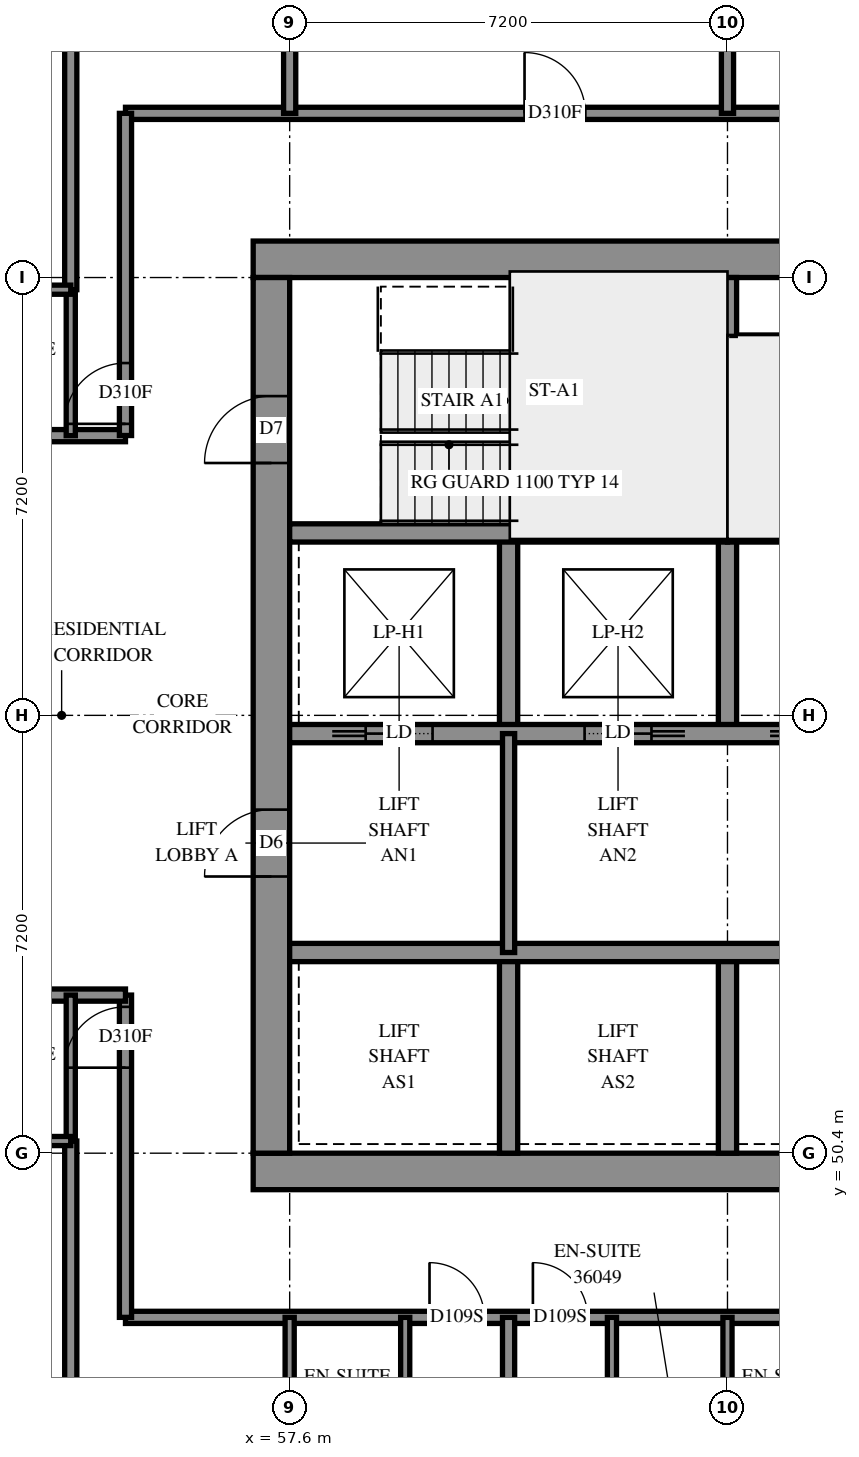
"""IFC4 building model, lengths in metres.
Left out: names, types, materials, properties, quantities, classifications, styles, units other than length and angle.
Written with IfcOpenShell. Run it as: python <this file> out.ifc"""

import sys

from ifc_helpers import new_model, si_unit, direction, frame, frame_2d, origin, place, context, subcontext, project, spatial, rectangle, extrude, element, fill, save


model = new_model("IFC4")
c1 = context("Model", 3, precision=1e-05, world=origin(), true_north=direction((0.0, 1.0)))
c2 = subcontext(c1, "Body", "Model", "MODEL_VIEW")
j1 = project(units=[si_unit("LENGTHUNIT", "METRE"), si_unit("PLANEANGLEUNIT", "RADIAN")], contexts=[c1])
p1 = place(None, origin())
s1 = spatial("IfcSite", under=j1, at=p1, CompositionType="ELEMENT")
p2 = place(p1, origin())
s2 = spatial("IfcBuilding", under=s1, at=p2, CompositionType="ELEMENT")
p3 = place(p2, frame((0.0, 0.0, 135.4)))
s3 = spatial("IfcBuildingStorey", under=s2, at=p3, CompositionType="ELEMENT", Elevation=135.4)
p4 = place(p3, frame((57.0, 50.1, -0.3), z_axis=(0.0, 0.0, 1.0), x_axis=(1.0, 0.0, 0.0)))
e1 = element("IfcWall", 1, at=p4, inside=s3, PredefinedType="SHEAR", context=c2, shape_type="SweptSolid", body=[
    extrude(rectangle(XDim=15.6, YDim=0.6, at=frame_2d((7.8, 0.0))), origin(), (0.0, 0.0, 1.0), 2.7),
])
p5 = place(p3, frame((57.0, 65.1, -0.3), z_axis=(0.0, 0.0, 1.0), x_axis=(1.0, 0.0, 0.0)))
e2 = element("IfcWall", 2, at=p5, inside=s3, PredefinedType="SHEAR", context=c2, shape_type="SweptSolid", body=[
    extrude(rectangle(XDim=15.6, YDim=0.6, at=frame_2d((7.8, 0.0))), origin(), (0.0, 0.0, 1.0), 2.7),
])
p6 = place(p5, frame((10.6, 0.0, 0.3)))
e3 = element("IfcOpeningElement", 3, at=p6, cuts=e2, PredefinedType="OPENING", context=c2, shape_type="SweptSolid", body=[
    extrude(rectangle(XDim=0.8, YDim=2.1, at=frame_2d((0.4, 1.05))), frame((0.0, 0.31, 0.0), z_axis=(0.0, -1.0, 0.0), x_axis=(1.0, 0.0, 0.0)), (0.0, 0.0, 1.0), 0.62),
])
p7 = place(p3, frame((57.3, 50.4, -0.3), z_axis=(0.0, 0.0, 1.0), x_axis=(0.0, 1.0, 0.0)))
e4 = element("IfcWall", 4, at=p7, inside=s3, PredefinedType="SHEAR", context=c2, shape_type="SweptSolid", body=[
    extrude(rectangle(XDim=14.4, YDim=0.6, at=frame_2d((7.2, 0.0))), origin(), (0.0, 0.0, 1.0), 2.7),
])
p8 = place(p7, frame((4.55, 0.0, 0.3)))
e5 = element("IfcOpeningElement", 5, at=p8, cuts=e4, PredefinedType="OPENING", context=c2, shape_type="SweptSolid", body=[
    extrude(rectangle(XDim=1.1, YDim=2.1, at=frame_2d((0.55, 1.05))), frame((0.0, 0.31, 0.0), z_axis=(0.0, -1.0, 0.0), x_axis=(1.0, 0.0, 0.0)), (0.0, 0.0, 1.0), 0.62),
])
p9 = place(p7, frame((11.35, 0.0, 0.3)))
e6 = element("IfcOpeningElement", 6, at=p9, cuts=e4, PredefinedType="OPENING", context=c2, shape_type="SweptSolid", body=[
    extrude(rectangle(XDim=1.1, YDim=2.1, at=frame_2d((0.55, 1.05))), frame((0.0, 0.31, 0.0), z_axis=(0.0, -1.0, 0.0), x_axis=(1.0, 0.0, 0.0)), (0.0, 0.0, 1.0), 0.62),
])
for number, where, z_axis, x_axis in (
    (7, (61.2, 50.4, 0.0), (0.0, 0.0, 1.0), (0.0, 1.0, 0.0)),
    (8, (61.2, 57.3, 0.0), (0.0, 0.0, 1.0), (0.0, 1.0, 0.0)),
    (9, (64.8, 50.4, 0.0), (0.0, 0.0, 1.0), (0.0, 1.0, 0.0)),
    (10, (64.8, 57.3, 0.0), (0.0, 0.0, 1.0), (0.0, 1.0, 0.0)),
):
    element("IfcWall", number, at=place(p3, frame(where, z_axis=z_axis, x_axis=x_axis)), inside=s3, PredefinedType="SOLIDWALL", context=c2, shape_type="SweptSolid", body=[
        extrude(rectangle(XDim=3.3, YDim=0.3, at=frame_2d((1.65, 0.0))), origin(), (0.0, 0.0, 1.0), 3.1),
    ])
p10 = place(p3, frame((57.6, 53.7, 0.0), z_axis=(0.0, 0.0, 1.0), x_axis=(1.0, 0.0, 0.0)))
e11 = element("IfcWall", 11, at=p10, inside=s3, PredefinedType="SOLIDWALL", context=c2, shape_type="SweptSolid", body=[
    extrude(rectangle(XDim=14.4, YDim=0.3, at=frame_2d((7.2, 0.0))), origin(), (0.0, 0.0, 1.0), 3.1),
])
p11 = place(p10, frame((12.05, 0.0, 0.0)))
e12 = element("IfcOpeningElement", 12, at=p11, cuts=e11, PredefinedType="OPENING", context=c2, shape_type="SweptSolid", body=[
    extrude(rectangle(XDim=1.1, YDim=2.1, at=frame_2d((0.55, 1.05))), frame((0.0, 0.16, 0.0), z_axis=(0.0, -1.0, 0.0), x_axis=(1.0, 0.0, 0.0)), (0.0, 0.0, 1.0), 0.32),
])
p12 = place(p3, frame((57.6, 57.3, 0.0), z_axis=(0.0, 0.0, 1.0), x_axis=(1.0, 0.0, 0.0)))
e13 = element("IfcWall", 13, at=p12, inside=s3, PredefinedType="SOLIDWALL", context=c2, shape_type="SweptSolid", body=[
    extrude(rectangle(XDim=14.4, YDim=0.3, at=frame_2d((7.2, 0.0))), origin(), (0.0, 0.0, 1.0), 3.1),
])
p13 = place(p12, frame((1.25, 0.0, 0.0)))
e14 = element("IfcOpeningElement", 14, at=p13, cuts=e13, PredefinedType="OPENING", context=c2, shape_type="SweptSolid", body=[
    extrude(rectangle(XDim=1.1, YDim=2.1, at=frame_2d((0.55, 1.05))), frame((0.0, 0.16, 0.0), z_axis=(0.0, -1.0, 0.0), x_axis=(1.0, 0.0, 0.0)), (0.0, 0.0, 1.0), 0.32),
])
p14 = place(p12, frame((4.85, 0.0, 0.0)))
e15 = element("IfcOpeningElement", 15, at=p14, cuts=e13, PredefinedType="OPENING", context=c2, shape_type="SweptSolid", body=[
    extrude(rectangle(XDim=1.1, YDim=2.1, at=frame_2d((0.55, 1.05))), frame((0.0, 0.16, 0.0), z_axis=(0.0, -1.0, 0.0), x_axis=(1.0, 0.0, 0.0)), (0.0, 0.0, 1.0), 0.32),
])
p15 = place(p12, frame((8.45, 0.0, 0.0)))
e16 = element("IfcOpeningElement", 16, at=p15, cuts=e13, PredefinedType="OPENING", context=c2, shape_type="SweptSolid", body=[
    extrude(rectangle(XDim=1.1, YDim=2.1, at=frame_2d((0.55, 1.05))), frame((0.0, 0.16, 0.0), z_axis=(0.0, -1.0, 0.0), x_axis=(1.0, 0.0, 0.0)), (0.0, 0.0, 1.0), 0.32),
])
p16 = place(p12, frame((12.05, 0.0, 0.0)))
e17 = element("IfcOpeningElement", 17, at=p16, cuts=e13, PredefinedType="OPENING", context=c2, shape_type="SweptSolid", body=[
    extrude(rectangle(XDim=1.1, YDim=2.1, at=frame_2d((0.55, 1.05))), frame((0.0, 0.16, 0.0), z_axis=(0.0, -1.0, 0.0), x_axis=(1.0, 0.0, 0.0)), (0.0, 0.0, 1.0), 0.32),
])
for number, where, z_axis, x_axis in (
    (18, (57.6, 60.6, 0.0), (0.0, 0.0, 1.0), (1.0, 0.0, 0.0)),
    (19, (64.8, 60.6, 0.0), (0.0, 0.0, 1.0), (1.0, 0.0, 0.0)),
):
    element("IfcWall", number, at=place(p3, frame(where, z_axis=z_axis, x_axis=x_axis)), inside=s3, PredefinedType="SOLIDWALL", context=c2, shape_type="SweptSolid", body=[
        extrude(rectangle(XDim=7.2, YDim=0.3, at=frame_2d((3.6, 0.0))), origin(), (0.0, 0.0, 1.0), 3.1),
    ])
p17 = place(p3, frame((64.8, 60.6, 0.0), z_axis=(0.0, 0.0, 1.0), x_axis=(0.0, 1.0, 0.0)))
e20 = element("IfcWall", 20, at=p17, inside=s3, PredefinedType="SOLIDWALL", context=c2, shape_type="SweptSolid", body=[
    extrude(rectangle(XDim=4.2, YDim=0.3, at=frame_2d((2.1, 0.0))), origin(), (0.0, 0.0, 1.0), 3.1),
])
p18 = place(p3, frame((64.95, 63.78, 0.0), z_axis=(0.0, 0.0, 1.0), x_axis=(1.0, 0.0, 0.0)))
e21 = element("IfcWall", 21, at=p18, inside=s3, PredefinedType="PARTITIONING", context=c2, shape_type="SweptSolid", body=[
    extrude(rectangle(XDim=5.65, YDim=0.15, at=frame_2d((2.825, 0.0))), origin(), (0.0, 0.0, 1.0), 3.1),
])
p19 = place(p3, frame((61.2, 53.7, 0.0), z_axis=(0.0, 0.0, 1.0), x_axis=(0.0, 1.0, 0.0)))
e22 = element("IfcWall", 22, at=p19, inside=s3, PredefinedType="PARTITIONING", context=c2, shape_type="SweptSolid", body=[
    extrude(rectangle(XDim=3.6, YDim=0.2, at=frame_2d((1.8, 0.0))), origin(), (0.0, 0.0, 1.0), 3.1),
])
p20 = place(p3, frame((54.9, 67.5, 0.0), z_axis=(0.0, 0.0, 1.0), x_axis=(1.0, 0.0, 0.0)))
e23 = element("IfcWall", 23, at=p20, inside=s3, PredefinedType="PARTITIONING", context=c2, shape_type="SweptSolid", body=[
    extrude(rectangle(XDim=19.8, YDim=0.2, at=frame_2d((9.9, 0.0))), origin(), (0.0, 0.0, 1.0), 3.1),
])
p21 = place(p20, frame((6.562, 0.0, 0.0)))
e24 = element("IfcOpeningElement", 24, at=p21, cuts=e23, PredefinedType="OPENING", context=c2, shape_type="SweptSolid", body=[
    extrude(rectangle(XDim=1.0, YDim=2.1, at=frame_2d((0.5, 1.05))), frame((0.0, 0.11, 0.0), z_axis=(0.0, -1.0, 0.0), x_axis=(1.0, 0.0, 0.0)), (0.0, 0.0, 1.0), 0.22),
])
p22 = place(p20, frame((14.089, 0.0, 0.0)))
e25 = element("IfcOpeningElement", 25, at=p22, cuts=e23, PredefinedType="OPENING", context=c2, shape_type="SweptSolid", body=[
    extrude(rectangle(XDim=1.0, YDim=2.1, at=frame_2d((0.5, 1.05))), frame((0.0, 0.11, 0.0), z_axis=(0.0, -1.0, 0.0), x_axis=(1.0, 0.0, 0.0)), (0.0, 0.0, 1.0), 0.22),
])
p23 = place(p3, frame((54.9, 47.7, 0.0), z_axis=(0.0, 0.0, 1.0), x_axis=(1.0, 0.0, 0.0)))
e26 = element("IfcWall", 26, at=p23, inside=s3, PredefinedType="PARTITIONING", context=c2, shape_type="SweptSolid", body=[
    extrude(rectangle(XDim=19.326, YDim=0.2, at=frame_2d((9.663, 0.0))), origin(), (0.0, 0.0, 1.0), 3.1),
])
p24 = place(p23, frame((5.0, 0.0, 0.0)))
e27 = element("IfcOpeningElement", 27, at=p24, cuts=e26, PredefinedType="OPENING", context=c2, shape_type="SweptSolid", body=[
    extrude(rectangle(XDim=0.9, YDim=2.1, at=frame_2d((0.45, 1.05))), frame((0.0, 0.11, 0.0), z_axis=(0.0, -1.0, 0.0), x_axis=(1.0, 0.0, 0.0)), (0.0, 0.0, 1.0), 0.22),
])
p25 = place(p23, frame((12.2, 0.0, 0.0)))
e28 = element("IfcOpeningElement", 28, at=p25, cuts=e26, PredefinedType="OPENING", context=c2, shape_type="SweptSolid", body=[
    extrude(rectangle(XDim=0.9, YDim=2.1, at=frame_2d((0.45, 1.05))), frame((0.0, 0.11, 0.0), z_axis=(0.0, -1.0, 0.0), x_axis=(1.0, 0.0, 0.0)), (0.0, 0.0, 1.0), 0.22),
])
p26 = place(p23, frame((6.7, 0.0, 0.0)))
e29 = element("IfcOpeningElement", 29, at=p26, cuts=e26, PredefinedType="OPENING", context=c2, shape_type="SweptSolid", body=[
    extrude(rectangle(XDim=0.9, YDim=2.1, at=frame_2d((0.45, 1.05))), frame((0.0, 0.11, 0.0), z_axis=(0.0, -1.0, 0.0), x_axis=(1.0, 0.0, 0.0)), (0.0, 0.0, 1.0), 0.22),
])
p27 = place(p23, frame((13.9, 0.0, 0.0)))
e30 = element("IfcOpeningElement", 30, at=p27, cuts=e26, PredefinedType="OPENING", context=c2, shape_type="SweptSolid", body=[
    extrude(rectangle(XDim=0.9, YDim=2.1, at=frame_2d((0.45, 1.05))), frame((0.0, 0.11, 0.0), z_axis=(0.0, -1.0, 0.0), x_axis=(1.0, 0.0, 0.0)), (0.0, 0.0, 1.0), 0.22),
])
p28 = place(p3, frame((40.602, 62.2, 0.0), z_axis=(0.0, 0.0, 1.0), x_axis=(1.0, 0.0, 0.0)))
e31 = element("IfcWall", 31, at=p28, inside=s3, PredefinedType="PARTITIONING", context=c2, shape_type="SweptSolid", body=[
    extrude(rectangle(XDim=14.298, YDim=0.2, at=frame_2d((7.149, 0.0))), origin(), (0.0, 0.0, 1.0), 3.1),
])
p29 = place(p28, frame((1.306, 0.0, 0.0)))
e32 = element("IfcOpeningElement", 32, at=p29, cuts=e31, PredefinedType="OPENING", context=c2, shape_type="SweptSolid", body=[
    extrude(rectangle(XDim=0.9, YDim=2.1, at=frame_2d((0.45, 1.05))), frame((0.0, 0.11, 0.0), z_axis=(0.0, -1.0, 0.0), x_axis=(1.0, 0.0, 0.0)), (0.0, 0.0, 1.0), 0.22),
])
p30 = place(p28, frame((8.455, 0.0, 0.0)))
e33 = element("IfcOpeningElement", 33, at=p30, cuts=e31, PredefinedType="OPENING", context=c2, shape_type="SweptSolid", body=[
    extrude(rectangle(XDim=0.9, YDim=2.1, at=frame_2d((0.45, 1.05))), frame((0.0, 0.11, 0.0), z_axis=(0.0, -1.0, 0.0), x_axis=(1.0, 0.0, 0.0)), (0.0, 0.0, 1.0), 0.22),
])
p31 = place(p3, frame((54.0, 42.381, 0.0), z_axis=(0.0, 0.0, 1.0), x_axis=(0.0, 1.0, 0.0)))
e34 = element("IfcWall", 34, at=p31, inside=s3, PredefinedType="PARTITIONING", context=c2, shape_type="SweptSolid", body=[
    extrude(rectangle(XDim=8.219, YDim=0.2, at=frame_2d((4.109, 0.0))), origin(), (0.0, 0.0, 1.0), 3.1),
])
p32 = place(p3, frame((54.0, 64.6, 0.0), z_axis=(0.0, 0.0, 1.0), x_axis=(0.0, 1.0, 0.0)))
e35 = element("IfcWall", 35, at=p32, inside=s3, PredefinedType="PARTITIONING", context=c2, shape_type="SweptSolid", body=[
    extrude(rectangle(XDim=8.133, YDim=0.2, at=frame_2d((4.066, 0.0))), origin(), (0.0, 0.0, 1.0), 3.1),
])
p33 = place(p3, frame((54.9, 47.7, 0.0), z_axis=(0.0, 0.0, 1.0), x_axis=(0.0, 1.0, 0.0)))
e36 = element("IfcWall", 36, at=p33, inside=s3, PredefinedType="PARTITIONING", context=c2, shape_type="SweptSolid", body=[
    extrude(rectangle(XDim=5.3, YDim=0.2, at=frame_2d((2.65, 0.0))), origin(), (0.0, 0.0, 1.0), 3.1),
])
p34 = place(p33, frame((4.106, 0.0, 0.0)))
e37 = element("IfcOpeningElement", 37, at=p34, cuts=e36, PredefinedType="OPENING", context=c2, shape_type="SweptSolid", body=[
    extrude(rectangle(XDim=1.0, YDim=2.1, at=frame_2d((0.5, 1.05))), frame((0.0, 0.11, 0.0), z_axis=(0.0, -1.0, 0.0), x_axis=(1.0, 0.0, 0.0)), (0.0, 0.0, 1.0), 0.22),
])
p35 = place(p3, frame((61.2, 42.35, 0.0), z_axis=(0.0, 0.0, 1.0), x_axis=(0.0, 1.0, 0.0)))
e38 = element("IfcWall", 38, at=p35, inside=s3, PredefinedType="PARTITIONING", context=c2, shape_type="SweptSolid", body=[
    extrude(rectangle(XDim=5.35, YDim=0.2, at=frame_2d((2.675, 0.0))), origin(), (0.0, 0.0, 1.0), 3.1),
])
p36 = place(p3, frame((54.9, 62.202, 0.0), z_axis=(0.0, 0.0, 1.0), x_axis=(0.0, 1.0, 0.0)))
e39 = element("IfcWall", 39, at=p36, inside=s3, PredefinedType="PARTITIONING", context=c2, shape_type="SweptSolid", body=[
    extrude(rectangle(XDim=5.298, YDim=0.2, at=frame_2d((2.649, 0.0))), origin(), (0.0, 0.0, 1.0), 3.1),
])
p37 = place(p36, frame((0.192, 0.0, 0.0)))
e40 = element("IfcOpeningElement", 40, at=p37, cuts=e39, PredefinedType="OPENING", context=c2, shape_type="SweptSolid", body=[
    extrude(rectangle(XDim=1.0, YDim=2.1, at=frame_2d((0.5, 1.05))), frame((0.0, 0.11, 0.0), z_axis=(0.0, -1.0, 0.0), x_axis=(1.0, 0.0, 0.0)), (0.0, 0.0, 1.0), 0.22),
])
p38 = place(p3, frame((50.4, 53.0, 0.0), z_axis=(0.0, 0.0, 1.0), x_axis=(1.0, 0.0, 0.0)))
e41 = element("IfcWall", 41, at=p38, inside=s3, PredefinedType="PARTITIONING", context=c2, shape_type="SweptSolid", body=[
    extrude(rectangle(XDim=4.5, YDim=0.2, at=frame_2d((2.25, 0.0))), origin(), (0.0, 0.0, 1.0), 3.1),
])
p39 = place(p38, frame((0.4, 0.0, 0.0)))
e42 = element("IfcOpeningElement", 42, at=p39, cuts=e41, PredefinedType="OPENING", context=c2, shape_type="SweptSolid", body=[
    extrude(rectangle(XDim=0.9, YDim=2.1, at=frame_2d((0.45, 1.05))), frame((0.0, 0.11, 0.0), z_axis=(0.0, -1.0, 0.0), x_axis=(1.0, 0.0, 0.0)), (0.0, 0.0, 1.0), 0.22),
])
for number, where, z_axis, x_axis in (
    (43, (57.6, 67.5, 0.0), (0.0, 0.0, 1.0), (0.0, 1.0, 0.0)),
    (44, (64.8, 67.5, 0.0), (0.0, 0.0, 1.0), (0.0, 1.0, 0.0)),
):
    element("IfcWall", number, at=place(p3, frame(where, z_axis=z_axis, x_axis=x_axis)), inside=s3, PredefinedType="PARTITIONING", context=c2, shape_type="SweptSolid", body=[
        extrude(rectangle(XDim=4.05, YDim=0.2, at=frame_2d((2.025, 0.0))), origin(), (0.0, 0.0, 1.0), 3.1),
    ])
for number, where, z_axis, x_axis in (
    (45, (59.5, 45.3, 0.0), (0.0, 0.0, 1.0), (0.0, 1.0, 0.0)),
    (46, (57.6, 45.3, 0.0), (0.0, 0.0, 1.0), (0.0, 1.0, 0.0)),
    (47, (62.9, 45.3, 0.0), (0.0, 0.0, 1.0), (0.0, 1.0, 0.0)),
    (48, (64.8, 45.3, 0.0), (0.0, 0.0, 1.0), (0.0, 1.0, 0.0)),
    (49, (54.0, 50.6, 0.0), (0.0, 0.0, 1.0), (0.0, 1.0, 0.0)),
    (50, (54.0, 62.2, 0.0), (0.0, 0.0, 1.0), (0.0, 1.0, 0.0)),
):
    element("IfcWall", number, at=place(p3, frame(where, z_axis=z_axis, x_axis=x_axis)), inside=s3, PredefinedType="PARTITIONING", context=c2, shape_type="SweptSolid", body=[
        extrude(rectangle(XDim=2.4, YDim=0.15, at=frame_2d((1.2, 0.0))), origin(), (0.0, 0.0, 1.0), 3.1),
    ])
p40 = place(p3, frame((52.1, 64.6, 0.0), z_axis=(0.0, 0.0, 1.0), x_axis=(1.0, 0.0, 0.0)))
e51 = element("IfcWall", 51, at=p40, inside=s3, PredefinedType="PARTITIONING", context=c2, shape_type="SweptSolid", body=[
    extrude(rectangle(XDim=1.9, YDim=0.15, at=frame_2d((0.95, 0.0))), origin(), (0.0, 0.0, 1.0), 3.1),
])
p41 = place(p40, frame((0.493, 0.0, 0.0)))
e52 = element("IfcOpeningElement", 52, at=p41, cuts=e51, PredefinedType="OPENING", context=c2, shape_type="SweptSolid", body=[
    extrude(rectangle(XDim=0.8, YDim=2.1, at=frame_2d((0.4, 1.05))), frame((0.0, 0.085, 0.0), z_axis=(0.0, -1.0, 0.0), x_axis=(1.0, 0.0, 0.0)), (0.0, 0.0, 1.0), 0.17),
])
p42 = place(p3, frame((52.1, 50.6, 0.0), z_axis=(0.0, 0.0, 1.0), x_axis=(1.0, 0.0, 0.0)))
e53 = element("IfcWall", 53, at=p42, inside=s3, PredefinedType="PARTITIONING", context=c2, shape_type="SweptSolid", body=[
    extrude(rectangle(XDim=1.9, YDim=0.15, at=frame_2d((0.95, 0.0))), origin(), (0.0, 0.0, 1.0), 3.1),
])
p43 = place(p42, frame((0.493, 0.0, 0.0)))
e54 = element("IfcOpeningElement", 54, at=p43, cuts=e53, PredefinedType="OPENING", context=c2, shape_type="SweptSolid", body=[
    extrude(rectangle(XDim=0.8, YDim=2.1, at=frame_2d((0.4, 1.05))), frame((0.0, 0.085, 0.0), z_axis=(0.0, -1.0, 0.0), x_axis=(1.0, 0.0, 0.0)), (0.0, 0.0, 1.0), 0.17),
])
p44 = place(p8, origin())
e55 = element("IfcDoor", 55, at=p44, inside=s3, OperationType="DOUBLE_DOOR_SINGLE_SWING", PredefinedType="DOOR", context=c2, shape_type="SweptSolid", body=[
    extrude(rectangle(XDim=1.1, YDim=2.1, at=frame_2d((0.55, 1.05))), frame((0.0, 0.025, 0.0), z_axis=(0.0, -1.0, 0.0), x_axis=(1.0, 0.0, 0.0)), (0.0, 0.0, 1.0), 0.05),
])
fill(e5, e55)
p45 = place(p9, origin())
e56 = element("IfcDoor", 56, at=p45, inside=s3, OperationType="SINGLE_SWING_LEFT", PredefinedType="DOOR", context=c2, shape_type="SweptSolid", body=[
    extrude(rectangle(XDim=1.1, YDim=2.1, at=frame_2d((0.55, 1.05))), frame((0.0, 0.025, 0.0), z_axis=(0.0, -1.0, 0.0), x_axis=(1.0, 0.0, 0.0)), (0.0, 0.0, 1.0), 0.05),
])
fill(e6, e56)
p46 = place(p13, origin())
e57 = element("IfcDoor", 57, at=p46, inside=s3, OperationType="SLIDING_TO_LEFT", PredefinedType="DOOR", context=c2, shape_type="SweptSolid", body=[
    extrude(rectangle(XDim=1.1, YDim=2.1, at=frame_2d((0.55, 1.05))), frame((0.0, 0.025, 0.0), z_axis=(0.0, -1.0, 0.0), x_axis=(1.0, 0.0, 0.0)), (0.0, 0.0, 1.0), 0.05),
])
fill(e14, e57)
p47 = place(p14, origin())
e58 = element("IfcDoor", 58, at=p47, inside=s3, OperationType="SLIDING_TO_RIGHT", PredefinedType="DOOR", context=c2, shape_type="SweptSolid", body=[
    extrude(rectangle(XDim=1.1, YDim=2.1, at=frame_2d((0.55, 1.05))), frame((0.0, 0.025, 0.0), z_axis=(0.0, -1.0, 0.0), x_axis=(1.0, 0.0, 0.0)), (0.0, 0.0, 1.0), 0.05),
])
fill(e15, e58)
p48 = place(p37, origin())
e59 = element("IfcDoor", 59, at=p48, inside=s3, OperationType="SINGLE_SWING_LEFT", PredefinedType="DOOR", context=c2, shape_type="SweptSolid", body=[
    extrude(rectangle(XDim=1.0, YDim=2.1, at=frame_2d((0.5, 1.05))), frame((0.0, 0.025, 0.0), z_axis=(0.0, -1.0, 0.0), x_axis=(1.0, 0.0, 0.0)), (0.0, 0.0, 1.0), 0.05),
])
fill(e40, e59)
p49 = place(p34, origin())
e60 = element("IfcDoor", 60, at=p49, inside=s3, OperationType="SINGLE_SWING_RIGHT", PredefinedType="DOOR", context=c2, shape_type="SweptSolid", body=[
    extrude(rectangle(XDim=1.0, YDim=2.1, at=frame_2d((0.5, 1.05))), frame((0.0, 0.025, 0.0), z_axis=(0.0, -1.0, 0.0), x_axis=(1.0, 0.0, 0.0)), (0.0, 0.0, 1.0), 0.05),
])
fill(e37, e60)
p50 = place(p24, origin())
e61 = element("IfcDoor", 61, at=p50, inside=s3, OperationType="SINGLE_SWING_LEFT", PredefinedType="DOOR", context=c2, shape_type="SweptSolid", body=[
    extrude(rectangle(XDim=0.9, YDim=2.1, at=frame_2d((0.45, 1.05))), frame((0.0, 0.025, 0.0), z_axis=(0.0, -1.0, 0.0), x_axis=(1.0, 0.0, 0.0)), (0.0, 0.0, 1.0), 0.05),
])
fill(e27, e61)
p51 = place(p21, origin())
e62 = element("IfcDoor", 62, at=p51, inside=s3, OperationType="SINGLE_SWING_RIGHT", PredefinedType="DOOR", context=c2, shape_type="SweptSolid", body=[
    extrude(rectangle(XDim=1.0, YDim=2.1, at=frame_2d((0.5, 1.05))), frame((0.0, 0.025, 0.0), z_axis=(0.0, -1.0, 0.0), x_axis=(1.0, 0.0, 0.0)), (0.0, 0.0, 1.0), 0.05),
])
fill(e24, e62)
p52 = place(p26, origin())
e63 = element("IfcDoor", 63, at=p52, inside=s3, OperationType="SINGLE_SWING_RIGHT", PredefinedType="DOOR", context=c2, shape_type="SweptSolid", body=[
    extrude(rectangle(XDim=0.9, YDim=2.1, at=frame_2d((0.45, 1.05))), frame((0.0, 0.025, 0.0), z_axis=(0.0, -1.0, 0.0), x_axis=(1.0, 0.0, 0.0)), (0.0, 0.0, 1.0), 0.05),
])
fill(e29, e63)
save(model, sys.argv[1])
